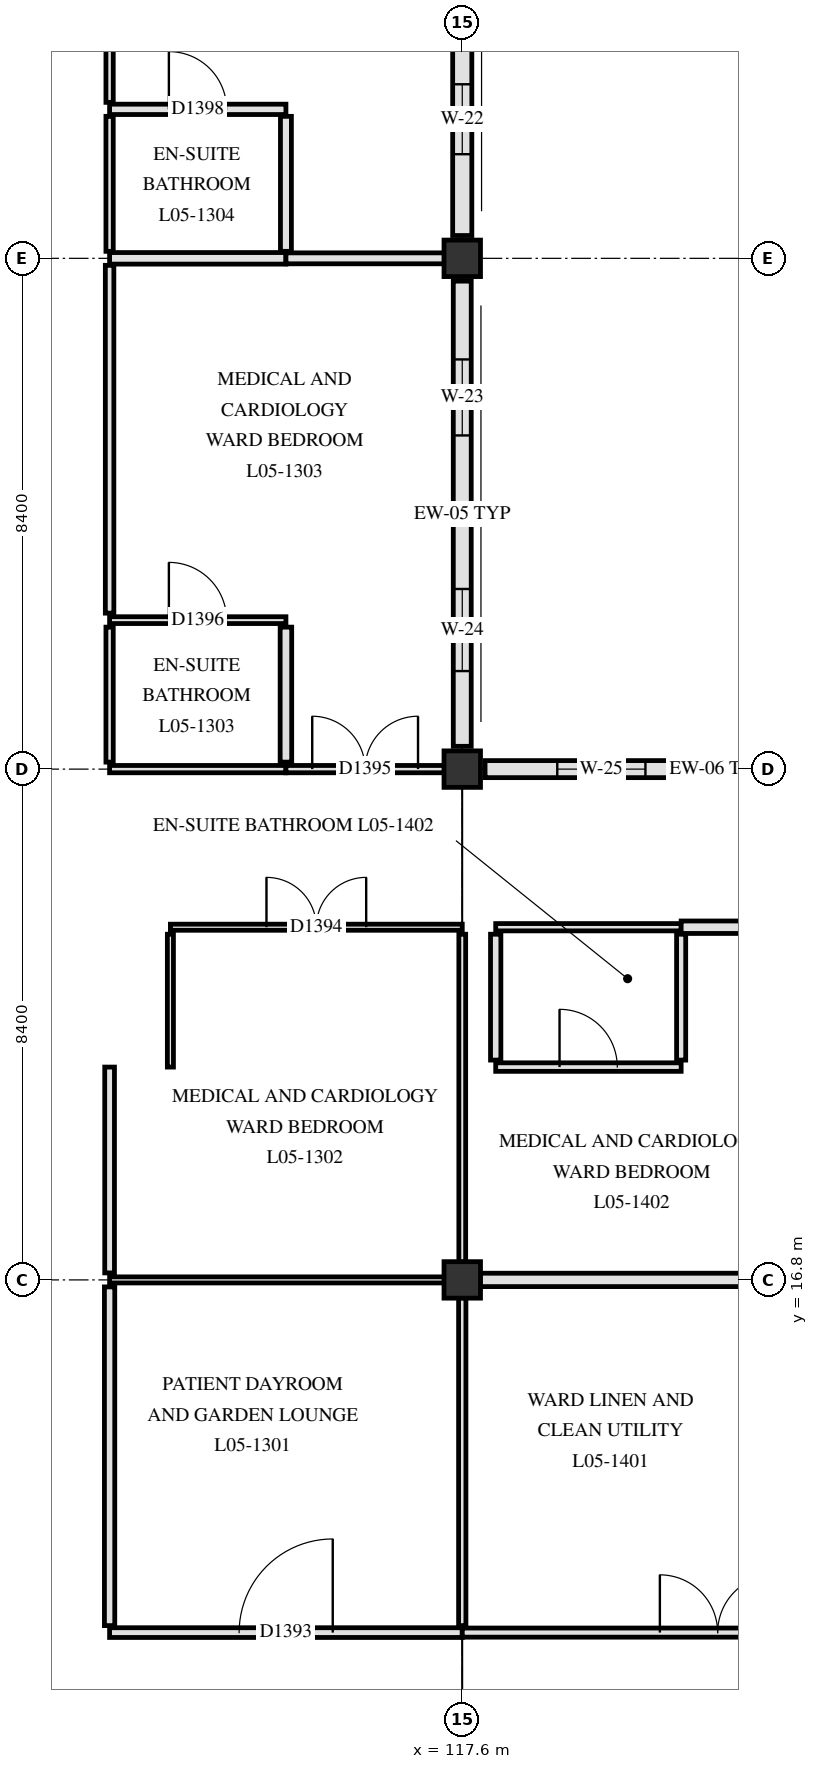
"""IFC4 building model, lengths in metres.
Left out: names, types, materials, properties, quantities, classifications, styles, units other than length and angle.
Written with IfcOpenShell. Run it as: python <this file> out.ifc"""

import sys

from ifc_helpers import new_model, si_unit, direction, frame, frame_2d, origin, origin_2d, place, context, subcontext, project, spatial, rectangle, extrude, element, fill, save


model = new_model("IFC4")
c1 = context("Model", 3, precision=1e-05, world=origin(), true_north=direction((0.0, 1.0)))
c2 = subcontext(c1, "Body", "Model", "MODEL_VIEW")
j1 = project(units=[si_unit("LENGTHUNIT", "METRE"), si_unit("PLANEANGLEUNIT", "RADIAN")], contexts=[c1])
p1 = place(None, origin())
s1 = spatial("IfcSite", under=j1, at=p1, CompositionType="ELEMENT")
p2 = place(p1, origin())
s2 = spatial("IfcBuilding", under=s1, at=p2, CompositionType="ELEMENT")
p3 = place(p2, frame((0.0, 0.0, 22.5)))
s3 = spatial("IfcBuildingStorey", under=s2, at=p3, CompositionType="ELEMENT", Elevation=22.5)
for number, where, z_axis, x_axis in (
    (1, (117.6, 16.8, 0.0), (0.0, 0.0, 1.0), (1.0, 0.0, 0.0)),
    (2, (117.6, 25.2, 0.0), (0.0, 0.0, 1.0), (1.0, 0.0, 0.0)),
    (3, (117.6, 33.6, 0.0), (0.0, 0.0, 1.0), (1.0, 0.0, 0.0)),
):
    element("IfcColumn", number, at=place(p3, frame(where, z_axis=z_axis, x_axis=x_axis)), inside=s3, PredefinedType="COLUMN", context=c2, shape_type="SweptSolid", body=[
        extrude(rectangle(XDim=0.6, YDim=0.6, at=origin_2d()), origin(), (0.0, 0.0, 1.0), 3.9),
    ])
p4 = place(p3, frame((117.6, 41.625, 0.0), z_axis=(0.0, 0.0, 1.0), x_axis=(0.0, -1.0, 0.0)))
e4 = element("IfcWall", 4, at=p4, inside=s3, PredefinedType="SOLIDWALL", context=c2, shape_type="SweptSolid", body=[
    extrude(rectangle(XDim=7.65, YDim=0.315, at=frame_2d((3.825, 0.0))), origin(), (0.0, 0.0, 1.0), 3.34),
])
p5 = place(p4, frame((1.387, 0.0, 0.85)))
e5 = element("IfcOpeningElement", 5, at=p5, cuts=e4, PredefinedType="OPENING", context=c2, shape_type="SweptSolid", body=[
    extrude(rectangle(XDim=1.05, YDim=1.54, at=frame_2d((0.525, 0.77))), frame((0.0, 0.167, 0.0), z_axis=(0.0, -1.0, 0.0), x_axis=(1.0, 0.0, 0.0)), (0.0, 0.0, 1.0), 0.335),
])
p6 = place(p4, frame((5.163, 0.0, 0.85)))
e6 = element("IfcOpeningElement", 6, at=p6, cuts=e4, PredefinedType="OPENING", context=c2, shape_type="SweptSolid", body=[
    extrude(rectangle(XDim=1.15, YDim=1.54, at=frame_2d((0.575, 0.77))), frame((0.0, 0.167, 0.0), z_axis=(0.0, -1.0, 0.0), x_axis=(1.0, 0.0, 0.0)), (0.0, 0.0, 1.0), 0.335),
])
p7 = place(p3, frame((117.6, 33.225, 0.0), z_axis=(0.0, 0.0, 1.0), x_axis=(0.0, -1.0, 0.0)))
e7 = element("IfcWall", 7, at=p7, inside=s3, PredefinedType="SOLIDWALL", context=c2, shape_type="SweptSolid", body=[
    extrude(rectangle(XDim=7.65, YDim=0.295, at=frame_2d((3.825, 0.0))), origin(), (0.0, 0.0, 1.0), 3.34),
])
p8 = place(p7, frame((1.288, 0.0, 0.85)))
e8 = element("IfcOpeningElement", 8, at=p8, cuts=e7, PredefinedType="OPENING", context=c2, shape_type="SweptSolid", body=[
    extrude(rectangle(XDim=1.25, YDim=1.54, at=frame_2d((0.625, 0.77))), frame((0.0, 0.157, 0.0), z_axis=(0.0, -1.0, 0.0), x_axis=(1.0, 0.0, 0.0)), (0.0, 0.0, 1.0), 0.315),
])
p9 = place(p7, frame((5.062, 0.0, 0.85)))
e9 = element("IfcOpeningElement", 9, at=p9, cuts=e7, PredefinedType="OPENING", context=c2, shape_type="SweptSolid", body=[
    extrude(rectangle(XDim=1.35, YDim=1.54, at=frame_2d((0.675, 0.77))), frame((0.0, 0.157, 0.0), z_axis=(0.0, -1.0, 0.0), x_axis=(1.0, 0.0, 0.0)), (0.0, 0.0, 1.0), 0.315),
])
p10 = place(p3, frame((117.975, 25.2, 0.0), z_axis=(0.0, 0.0, 1.0), x_axis=(1.0, 0.0, 0.0)))
e10 = element("IfcWall", 10, at=p10, inside=s3, PredefinedType="SOLIDWALL", context=c2, shape_type="SweptSolid", body=[
    extrude(rectangle(XDim=7.65, YDim=0.28, at=frame_2d((3.825, 0.0))), origin(), (0.0, 0.0, 1.0), 3.31),
])
p11 = place(p10, frame((1.188, 0.0, 0.85)))
e11 = element("IfcOpeningElement", 11, at=p11, cuts=e10, PredefinedType="OPENING", context=c2, shape_type="SweptSolid", body=[
    extrude(rectangle(XDim=1.45, YDim=1.54, at=frame_2d((0.725, 0.77))), frame((0.0, 0.15, 0.0), z_axis=(0.0, -1.0, 0.0), x_axis=(1.0, 0.0, 0.0)), (0.0, 0.0, 1.0), 0.3),
])
p12 = place(p10, frame((4.962, 0.0, 0.85)))
e12 = element("IfcOpeningElement", 12, at=p12, cuts=e10, PredefinedType="OPENING", context=c2, shape_type="SweptSolid", body=[
    extrude(rectangle(XDim=1.55, YDim=1.54, at=frame_2d((0.775, 0.77))), frame((0.0, 0.15, 0.0), z_axis=(0.0, -1.0, 0.0), x_axis=(1.0, 0.0, 0.0)), (0.0, 0.0, 1.0), 0.3),
])
p13 = place(p3, frame((111.8, 11.0, 0.0), z_axis=(0.0, 0.0, 1.0), x_axis=(1.0, 0.0, 0.0)))
e13 = element("IfcWall", 13, at=p13, inside=s3, PredefinedType="PARTITIONING", context=c2, shape_type="SweptSolid", body=[
    extrude(rectangle(XDim=5.8, YDim=0.16, at=frame_2d((2.9, 0.0))), origin(), (0.0, 0.0, 1.0), 3.3),
])
p14 = place(p13, frame((2.13, 0.0, 0.0)))
e14 = element("IfcOpeningElement", 14, at=p14, cuts=e13, PredefinedType="OPENING", context=c2, shape_type="SweptSolid", body=[
    extrude(rectangle(XDim=1.54, YDim=2.24, at=frame_2d((0.77, 1.12))), frame((0.0, 0.09, 0.0), z_axis=(0.0, -1.0, 0.0), x_axis=(1.0, 0.0, 0.0)), (0.0, 0.0, 1.0), 0.18),
])
p15 = place(p3, frame((117.6, 11.0, 0.0), z_axis=(0.0, 0.0, 1.0), x_axis=(1.0, 0.0, 0.0)))
e15 = element("IfcWall", 15, at=p15, inside=s3, PredefinedType="PARTITIONING", context=c2, shape_type="SweptSolid", body=[
    extrude(rectangle(XDim=8.4, YDim=0.15, at=frame_2d((4.2, 0.0))), origin(), (0.0, 0.0, 1.0), 3.3),
])
p16 = place(p15, frame((3.25, 0.0, 0.0)))
e16 = element("IfcOpeningElement", 16, at=p16, cuts=e15, PredefinedType="OPENING", context=c2, shape_type="SweptSolid", body=[
    extrude(rectangle(XDim=1.9, YDim=2.3, at=frame_2d((0.95, 1.15))), frame((0.0, 0.085, 0.0), z_axis=(0.0, -1.0, 0.0), x_axis=(1.0, 0.0, 0.0)), (0.0, 0.0, 1.0), 0.17),
])
p17 = place(p3, frame((111.8, 16.8, 0.0), z_axis=(0.0, 0.0, 1.0), x_axis=(1.0, 0.0, 0.0)))
e17 = element("IfcWall", 17, at=p17, inside=s3, PredefinedType="PARTITIONING", context=c2, shape_type="SweptSolid", body=[
    extrude(rectangle(XDim=5.505, YDim=0.1, at=frame_2d((2.752, 0.0))), origin(), (0.0, 0.0, 1.0), 3.16),
])
p18 = place(p3, frame((117.895, 16.8, 0.0), z_axis=(0.0, 0.0, 1.0), x_axis=(1.0, 0.0, 0.0)))
e18 = element("IfcWall", 18, at=p18, inside=s3, PredefinedType="PARTITIONING", context=c2, shape_type="SweptSolid", body=[
    extrude(rectangle(XDim=7.81, YDim=0.22, at=frame_2d((3.905, 0.0))), origin(), (0.0, 0.0, 1.0), 3.16),
])
p19 = place(p3, frame((118.15, 20.3, 0.0), z_axis=(0.0, 0.0, 1.0), x_axis=(1.0, 0.0, 0.0)))
e19 = element("IfcWall", 19, at=p19, inside=s3, PredefinedType="PARTITIONING", context=c2, shape_type="SweptSolid", body=[
    extrude(rectangle(XDim=3.05, YDim=0.14, at=frame_2d((1.525, 0.0))), origin(), (0.0, 0.0, 1.0), 3.61),
])
p20 = place(p19, frame((1.05, 0.0, 0.0)))
e20 = element("IfcOpeningElement", 20, at=p20, cuts=e19, PredefinedType="OPENING", context=c2, shape_type="SweptSolid", body=[
    extrude(rectangle(XDim=0.95, YDim=2.1, at=frame_2d((0.475, 1.05))), frame((0.0, 0.08, 0.0), z_axis=(0.0, -1.0, 0.0), x_axis=(1.0, 0.0, 0.0)), (0.0, 0.0, 1.0), 0.16),
])
p21 = place(p3, frame((112.8, 22.6, 0.0), z_axis=(0.0, 0.0, 1.0), x_axis=(1.0, 0.0, 0.0)))
e21 = element("IfcWall", 21, at=p21, inside=s3, PredefinedType="PARTITIONING", context=c2, shape_type="SweptSolid", body=[
    extrude(rectangle(XDim=4.8, YDim=0.1, at=frame_2d((2.4, 0.0))), origin(), (0.0, 0.0, 1.0), 3.3),
])
p22 = place(p21, frame((1.58, 0.0, 0.0)))
e22 = element("IfcOpeningElement", 22, at=p22, cuts=e21, PredefinedType="OPENING", context=c2, shape_type="SweptSolid", body=[
    extrude(rectangle(XDim=1.64, YDim=2.28, at=frame_2d((0.82, 1.14))), frame((0.0, 0.06, 0.0), z_axis=(0.0, -1.0, 0.0), x_axis=(1.0, 0.0, 0.0)), (0.0, 0.0, 1.0), 0.12),
])
p23 = place(p3, frame((118.15, 22.6, 0.0), z_axis=(0.0, 0.0, 1.0), x_axis=(1.0, 0.0, 0.0)))
e23 = element("IfcWall", 23, at=p23, inside=s3, PredefinedType="PARTITIONING", context=c2, shape_type="SweptSolid", body=[
    extrude(rectangle(XDim=3.05, YDim=0.12, at=frame_2d((1.525, 0.0))), origin(), (0.0, 0.0, 1.0), 3.61),
])
p24 = place(p3, frame((121.2, 22.6, 0.0), z_axis=(0.0, 0.0, 1.0), x_axis=(1.0, 0.0, 0.0)))
e24 = element("IfcWall", 24, at=p24, inside=s3, PredefinedType="PARTITIONING", context=c2, shape_type="SweptSolid", body=[
    extrude(rectangle(XDim=4.8, YDim=0.205, at=frame_2d((2.4, 0.0))), origin(), (0.0, 0.0, 1.0), 3.3),
])
p25 = place(p24, frame((1.55, 0.0, 0.0)))
e25 = element("IfcOpeningElement", 25, at=p25, cuts=e24, PredefinedType="OPENING", context=c2, shape_type="SweptSolid", body=[
    extrude(rectangle(XDim=1.7, YDim=2.25, at=frame_2d((0.85, 1.125))), frame((0.0, 0.113, 0.0), z_axis=(0.0, -1.0, 0.0), x_axis=(1.0, 0.0, 0.0)), (0.0, 0.0, 1.0), 0.225),
])
p26 = place(p3, frame((111.8, 25.2, 0.0), z_axis=(0.0, 0.0, 1.0), x_axis=(1.0, 0.0, 0.0)))
e26 = element("IfcWall", 26, at=p26, inside=s3, PredefinedType="PARTITIONING", context=c2, shape_type="SweptSolid", body=[
    extrude(rectangle(XDim=2.9, YDim=0.12, at=frame_2d((1.45, 0.0))), origin(), (0.0, 0.0, 1.0), 3.16),
])
p27 = place(p3, frame((114.7, 25.2, 0.0), z_axis=(0.0, 0.0, 1.0), x_axis=(1.0, 0.0, 0.0)))
e27 = element("IfcWall", 27, at=p27, inside=s3, PredefinedType="PARTITIONING", context=c2, shape_type="SweptSolid", body=[
    extrude(rectangle(XDim=2.605, YDim=0.12, at=frame_2d((1.302, 0.0))), origin(), (0.0, 0.0, 1.0), 3.16),
])
p28 = place(p27, frame((0.433, 0.0, 0.0)))
e28 = element("IfcOpeningElement", 28, at=p28, cuts=e27, PredefinedType="OPENING", context=c2, shape_type="SweptSolid", body=[
    extrude(rectangle(XDim=1.74, YDim=2.24, at=frame_2d((0.87, 1.12))), frame((0.0, 0.07, 0.0), z_axis=(0.0, -1.0, 0.0), x_axis=(1.0, 0.0, 0.0)), (0.0, 0.0, 1.0), 0.14),
])
p29 = place(p3, frame((111.8, 27.65, 0.0), z_axis=(0.0, 0.0, 1.0), x_axis=(1.0, 0.0, 0.0)))
e29 = element("IfcWall", 29, at=p29, inside=s3, PredefinedType="PARTITIONING", context=c2, shape_type="SweptSolid", body=[
    extrude(rectangle(XDim=2.9, YDim=0.112, at=frame_2d((1.45, 0.0))), origin(), (0.0, 0.0, 1.0), 3.61),
])
p30 = place(p29, frame((0.975, 0.0, 0.0)))
e30 = element("IfcOpeningElement", 30, at=p30, cuts=e29, PredefinedType="OPENING", context=c2, shape_type="SweptSolid", body=[
    extrude(rectangle(XDim=0.95, YDim=2.1, at=frame_2d((0.475, 1.05))), frame((0.0, 0.066, 0.0), z_axis=(0.0, -1.0, 0.0), x_axis=(1.0, 0.0, 0.0)), (0.0, 0.0, 1.0), 0.132),
])
p31 = place(p3, frame((111.8, 33.6, 0.0), z_axis=(0.0, 0.0, 1.0), x_axis=(1.0, 0.0, 0.0)))
e31 = element("IfcWall", 31, at=p31, inside=s3, PredefinedType="PARTITIONING", context=c2, shape_type="SweptSolid", body=[
    extrude(rectangle(XDim=2.9, YDim=0.19, at=frame_2d((1.45, 0.0))), origin(), (0.0, 0.0, 1.0), 3.16),
])
p32 = place(p3, frame((114.7, 33.6, 0.0), z_axis=(0.0, 0.0, 1.0), x_axis=(1.0, 0.0, 0.0)))
e32 = element("IfcWall", 32, at=p32, inside=s3, PredefinedType="PARTITIONING", context=c2, shape_type="SweptSolid", body=[
    extrude(rectangle(XDim=2.605, YDim=0.18, at=frame_2d((1.302, 0.0))), origin(), (0.0, 0.0, 1.0), 3.16),
])
p33 = place(p3, frame((111.8, 36.05, 0.0), z_axis=(0.0, 0.0, 1.0), x_axis=(1.0, 0.0, 0.0)))
e33 = element("IfcWall", 33, at=p33, inside=s3, PredefinedType="PARTITIONING", context=c2, shape_type="SweptSolid", body=[
    extrude(rectangle(XDim=2.9, YDim=0.17, at=frame_2d((1.45, 0.0))), origin(), (0.0, 0.0, 1.0), 3.61),
])
p34 = place(p33, frame((0.975, 0.0, 0.0)))
e34 = element("IfcOpeningElement", 34, at=p34, cuts=e33, PredefinedType="OPENING", context=c2, shape_type="SweptSolid", body=[
    extrude(rectangle(XDim=0.95, YDim=2.1, at=frame_2d((0.475, 1.05))), frame((0.0, 0.095, 0.0), z_axis=(0.0, -1.0, 0.0), x_axis=(1.0, 0.0, 0.0)), (0.0, 0.0, 1.0), 0.19),
])
p35 = place(p3, frame((111.8, 11.115, 0.0), z_axis=(0.0, 0.0, 1.0), x_axis=(0.0, 1.0, 0.0)))
e35 = element("IfcWall", 35, at=p35, inside=s3, PredefinedType="PARTITIONING", context=c2, shape_type="SweptSolid", body=[
    extrude(rectangle(XDim=5.57, YDim=0.17, at=frame_2d((2.785, 0.0))), origin(), (0.0, 0.0, 1.0), 3.34),
])
p36 = place(p3, frame((111.8, 16.915, 0.0), z_axis=(0.0, 0.0, 1.0), x_axis=(0.0, 1.0, 0.0)))
e36 = element("IfcWall", 36, at=p36, inside=s3, PredefinedType="PARTITIONING", context=c2, shape_type="SweptSolid", body=[
    extrude(rectangle(XDim=3.385, YDim=0.16, at=frame_2d((1.692, 0.0))), origin(), (0.0, 0.0, 1.0), 3.34),
])
p37 = place(p3, frame((111.8, 25.315, 0.0), z_axis=(0.0, 0.0, 1.0), x_axis=(0.0, 1.0, 0.0)))
e37 = element("IfcWall", 37, at=p37, inside=s3, PredefinedType="PARTITIONING", context=c2, shape_type="SweptSolid", body=[
    extrude(rectangle(XDim=2.22, YDim=0.12, at=frame_2d((1.11, 0.0))), origin(), (0.0, 0.0, 1.0), 3.61),
])
p38 = place(p3, frame((111.8, 27.765, 0.0), z_axis=(0.0, 0.0, 1.0), x_axis=(0.0, 1.0, 0.0)))
e38 = element("IfcWall", 38, at=p38, inside=s3, PredefinedType="PARTITIONING", context=c2, shape_type="SweptSolid", body=[
    extrude(rectangle(XDim=5.72, YDim=0.14, at=frame_2d((2.86, 0.0))), origin(), (0.0, 0.0, 1.0), 3.34),
])
p39 = place(p3, frame((111.8, 33.715, 0.0), z_axis=(0.0, 0.0, 1.0), x_axis=(0.0, 1.0, 0.0)))
e39 = element("IfcWall", 39, at=p39, inside=s3, PredefinedType="PARTITIONING", context=c2, shape_type="SweptSolid", body=[
    extrude(rectangle(XDim=2.22, YDim=0.12, at=frame_2d((1.11, 0.0))), origin(), (0.0, 0.0, 1.0), 3.61),
])
p40 = place(p3, frame((111.8, 36.165, 0.0), z_axis=(0.0, 0.0, 1.0), x_axis=(0.0, 1.0, 0.0)))
e40 = element("IfcWall", 40, at=p40, inside=s3, PredefinedType="PARTITIONING", context=c2, shape_type="SweptSolid", body=[
    extrude(rectangle(XDim=5.72, YDim=0.12, at=frame_2d((2.86, 0.0))), origin(), (0.0, 0.0, 1.0), 3.34),
])
p41 = place(p3, frame((112.8, 20.3, 0.0), z_axis=(0.0, 0.0, 1.0), x_axis=(0.0, 1.0, 0.0)))
e41 = element("IfcWall", 41, at=p41, inside=s3, PredefinedType="PARTITIONING", context=c2, shape_type="SweptSolid", body=[
    extrude(rectangle(XDim=2.185, YDim=0.1, at=frame_2d((1.093, 0.0))), origin(), (0.0, 0.0, 1.0), 3.34),
])
p42 = place(p3, frame((114.7, 25.315, 0.0), z_axis=(0.0, 0.0, 1.0), x_axis=(0.0, 1.0, 0.0)))
e42 = element("IfcWall", 42, at=p42, inside=s3, PredefinedType="PARTITIONING", context=c2, shape_type="SweptSolid", body=[
    extrude(rectangle(XDim=2.22, YDim=0.19, at=frame_2d((1.11, 0.0))), origin(), (0.0, 0.0, 1.0), 3.61),
])
p43 = place(p3, frame((114.7, 33.715, 0.0), z_axis=(0.0, 0.0, 1.0), x_axis=(0.0, 1.0, 0.0)))
e43 = element("IfcWall", 43, at=p43, inside=s3, PredefinedType="PARTITIONING", context=c2, shape_type="SweptSolid", body=[
    extrude(rectangle(XDim=2.22, YDim=0.18, at=frame_2d((1.11, 0.0))), origin(), (0.0, 0.0, 1.0), 3.61),
])
p44 = place(p3, frame((117.6, 11.115, 0.0), z_axis=(0.0, 0.0, 1.0), x_axis=(0.0, 1.0, 0.0)))
e44 = element("IfcWall", 44, at=p44, inside=s3, PredefinedType="PARTITIONING", context=c2, shape_type="SweptSolid", body=[
    extrude(rectangle(XDim=5.39, YDim=0.12, at=frame_2d((2.695, 0.0))), origin(), (0.0, 0.0, 1.0), 3.3),
])
p45 = place(p3, frame((117.6, 17.095, 0.0), z_axis=(0.0, 0.0, 1.0), x_axis=(0.0, 1.0, 0.0)))
e45 = element("IfcWall", 45, at=p45, inside=s3, PredefinedType="PARTITIONING", context=c2, shape_type="SweptSolid", body=[
    extrude(rectangle(XDim=5.39, YDim=0.112, at=frame_2d((2.695, 0.0))), origin(), (0.0, 0.0, 1.0), 3.3),
])
p46 = place(p3, frame((118.15, 20.415, 0.0), z_axis=(0.0, 0.0, 1.0), x_axis=(0.0, 1.0, 0.0)))
e46 = element("IfcWall", 46, at=p46, inside=s3, PredefinedType="PARTITIONING", context=c2, shape_type="SweptSolid", body=[
    extrude(rectangle(XDim=2.07, YDim=0.17, at=frame_2d((1.035, 0.0))), origin(), (0.0, 0.0, 1.0), 3.34),
])
p47 = place(p3, frame((121.2, 20.415, 0.0), z_axis=(0.0, 0.0, 1.0), x_axis=(0.0, 1.0, 0.0)))
e47 = element("IfcWall", 47, at=p47, inside=s3, PredefinedType="PARTITIONING", context=c2, shape_type="SweptSolid", body=[
    extrude(rectangle(XDim=2.07, YDim=0.15, at=frame_2d((1.035, 0.0))), origin(), (0.0, 0.0, 1.0), 3.34),
])
p48 = place(p6, origin())
e48 = element("IfcWindow", 48, at=p48, inside=s3, PartitioningType="SINGLE_PANEL", PredefinedType="WINDOW", context=c2, shape_type="SweptSolid", body=[
    extrude(rectangle(XDim=1.15, YDim=1.54, at=frame_2d((0.575, 0.77))), frame((0.0, 0.03, 0.0), z_axis=(0.0, -1.0, 0.0), x_axis=(1.0, 0.0, 0.0)), (0.0, 0.0, 1.0), 0.06),
])
fill(e6, e48)
p49 = place(p8, origin())
e49 = element("IfcWindow", 49, at=p49, inside=s3, PartitioningType="SINGLE_PANEL", PredefinedType="WINDOW", context=c2, shape_type="SweptSolid", body=[
    extrude(rectangle(XDim=1.25, YDim=1.54, at=frame_2d((0.625, 0.77))), frame((0.0, 0.03, 0.0), z_axis=(0.0, -1.0, 0.0), x_axis=(1.0, 0.0, 0.0)), (0.0, 0.0, 1.0), 0.06),
])
fill(e8, e49)
p50 = place(p9, origin())
e50 = element("IfcWindow", 50, at=p50, inside=s3, PartitioningType="SINGLE_PANEL", PredefinedType="WINDOW", context=c2, shape_type="SweptSolid", body=[
    extrude(rectangle(XDim=1.35, YDim=1.54, at=frame_2d((0.675, 0.77))), frame((0.0, 0.03, 0.0), z_axis=(0.0, -1.0, 0.0), x_axis=(1.0, 0.0, 0.0)), (0.0, 0.0, 1.0), 0.06),
])
fill(e9, e50)
p51 = place(p11, origin())
e51 = element("IfcWindow", 51, at=p51, inside=s3, PartitioningType="SINGLE_PANEL", PredefinedType="WINDOW", context=c2, shape_type="SweptSolid", body=[
    extrude(rectangle(XDim=1.45, YDim=1.54, at=frame_2d((0.725, 0.77))), frame((0.0, 0.03, 0.0), z_axis=(0.0, -1.0, 0.0), x_axis=(1.0, 0.0, 0.0)), (0.0, 0.0, 1.0), 0.06),
])
fill(e11, e51)
p52 = place(p14, origin())
e52 = element("IfcDoor", 52, at=p52, inside=s3, OperationType="SINGLE_SWING_RIGHT", PredefinedType="DOOR", context=c2, shape_type="SweptSolid", body=[
    extrude(rectangle(XDim=1.54, YDim=2.24, at=frame_2d((0.77, 1.12))), frame((0.0, 0.025, 0.0), z_axis=(0.0, -1.0, 0.0), x_axis=(1.0, 0.0, 0.0)), (0.0, 0.0, 1.0), 0.05),
])
fill(e14, e52)
p53 = place(p22, origin())
e53 = element("IfcDoor", 53, at=p53, inside=s3, OperationType="DOUBLE_SWING_LEFT", PredefinedType="DOOR", context=c2, shape_type="SweptSolid", body=[
    extrude(rectangle(XDim=1.64, YDim=2.28, at=frame_2d((0.82, 1.14))), frame((0.0, 0.025, 0.0), z_axis=(0.0, -1.0, 0.0), x_axis=(1.0, 0.0, 0.0)), (0.0, 0.0, 1.0), 0.05),
])
fill(e22, e53)
p54 = place(p28, origin())
e54 = element("IfcDoor", 54, at=p54, inside=s3, OperationType="DOUBLE_SWING_RIGHT", PredefinedType="DOOR", context=c2, shape_type="SweptSolid", body=[
    extrude(rectangle(XDim=1.74, YDim=2.24, at=frame_2d((0.87, 1.12))), frame((0.0, 0.025, 0.0), z_axis=(0.0, -1.0, 0.0), x_axis=(1.0, 0.0, 0.0)), (0.0, 0.0, 1.0), 0.05),
])
fill(e28, e54)
p55 = place(p30, origin())
e55 = element("IfcDoor", 55, at=p55, inside=s3, OperationType="SINGLE_SWING_LEFT", PredefinedType="DOOR", context=c2, shape_type="SweptSolid", body=[
    extrude(rectangle(XDim=0.95, YDim=2.1, at=frame_2d((0.475, 1.05))), frame((0.0, 0.025, 0.0), z_axis=(0.0, -1.0, 0.0), x_axis=(1.0, 0.0, 0.0)), (0.0, 0.0, 1.0), 0.05),
])
fill(e30, e55)
p56 = place(p34, origin())
e56 = element("IfcDoor", 56, at=p56, inside=s3, OperationType="SINGLE_SWING_LEFT", PredefinedType="DOOR", context=c2, shape_type="SweptSolid", body=[
    extrude(rectangle(XDim=0.95, YDim=2.1, at=frame_2d((0.475, 1.05))), frame((0.0, 0.025, 0.0), z_axis=(0.0, -1.0, 0.0), x_axis=(1.0, 0.0, 0.0)), (0.0, 0.0, 1.0), 0.05),
])
fill(e34, e56)
p57 = place(p16, origin())
e57 = element("IfcDoor", 57, at=p57, inside=s3, OperationType="DOUBLE_SWING_LEFT", PredefinedType="DOOR", context=c2, shape_type="SweptSolid", body=[
    extrude(rectangle(XDim=1.9, YDim=2.3, at=frame_2d((0.95, 1.15))), frame((0.0, 0.025, 0.0), z_axis=(0.0, -1.0, 0.0), x_axis=(1.0, 0.0, 0.0)), (0.0, 0.0, 1.0), 0.05),
])
fill(e16, e57)
p58 = place(p20, origin())
e58 = element("IfcDoor", 58, at=p58, inside=s3, OperationType="SINGLE_SWING_LEFT", PredefinedType="DOOR", context=c2, shape_type="SweptSolid", body=[
    extrude(rectangle(XDim=0.95, YDim=2.1, at=frame_2d((0.475, 1.05))), frame((0.0, 0.025, 0.0), z_axis=(0.0, -1.0, 0.0), x_axis=(1.0, 0.0, 0.0)), (0.0, 0.0, 1.0), 0.05),
])
fill(e20, e58)
save(model, sys.argv[1])
